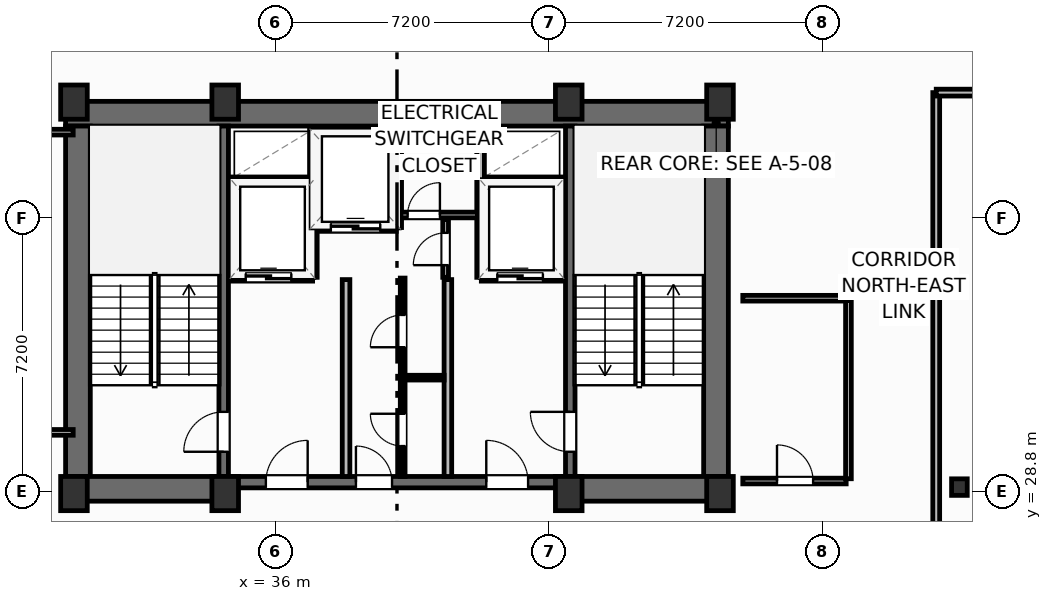
"""IFC4 building model, lengths in metres.
Left out: names, types, materials, properties, quantities, classifications, styles, units other than length and angle.
Written with IfcOpenShell. Run it as: python <this file> out.ifc"""

import sys

from ifc_helpers import new_model, si_unit, direction, frame, frame_2d, origin, origin_2d, place, context, subcontext, project, spatial, rectangle, i_section, extrude, element, fill, save


model = new_model("IFC4")
c1 = context("Model", 3, precision=1e-05, world=origin(), true_north=direction((0.0, 1.0)))
c2 = subcontext(c1, "Body", "Model", "MODEL_VIEW")
j1 = project(units=[si_unit("LENGTHUNIT", "METRE"), si_unit("PLANEANGLEUNIT", "RADIAN")], contexts=[c1])
p1 = place(None, origin())
s1 = spatial("IfcSite", under=j1, at=p1, CompositionType="ELEMENT")
p2 = place(p1, origin())
s2 = spatial("IfcBuilding", under=s1, at=p2, CompositionType="ELEMENT")
p3 = place(p2, frame((0.0, 0.0, 216.4)))
s3 = spatial("IfcBuildingStorey", under=s2, at=p3, CompositionType="ELEMENT", Elevation=216.4)
for number, where, z_axis, x_axis in (
    (1, (30.7, 28.75, 0.0), (0.0, 0.0, 1.0), (1.0, 0.0, 0.0)),
    (2, (34.68, 28.75, 0.0), (0.0, 0.0, 1.0), (1.0, 0.0, 0.0)),
    (3, (43.72, 28.75, 0.0), (0.0, 0.0, 1.0), (1.0, 0.0, 0.0)),
    (4, (47.7, 28.75, 0.0), (0.0, 0.0, 1.0), (1.0, 0.0, 0.0)),
    (5, (30.7, 39.05, 0.0), (0.0, 0.0, 1.0), (1.0, 0.0, 0.0)),
    (6, (34.68, 39.05, 0.0), (0.0, 0.0, 1.0), (1.0, 0.0, 0.0)),
    (7, (43.72, 39.05, 0.0), (0.0, 0.0, 1.0), (1.0, 0.0, 0.0)),
    (8, (47.7, 39.05, 0.0), (0.0, 0.0, 1.0), (1.0, 0.0, 0.0)),
):
    element("IfcColumn", number, at=place(p3, frame(where, z_axis=z_axis, x_axis=x_axis)), inside=s3, PredefinedType="COLUMN", context=c2, shape_type="SweptSolid", body=[
        extrude(rectangle(XDim=0.7, YDim=0.9, at=origin_2d()), origin(), (0.0, 0.0, 1.0), 3.7),
    ])
p4 = place(p3, frame((54.0, 28.92, 0.0), z_axis=(0.0, 0.0, 1.0), x_axis=(1.0, 0.0, 0.0)))
e9 = element("IfcColumn", 9, at=p4, inside=s3, PredefinedType="COLUMN", context=c2, shape_type="SweptSolid", body=[
    extrude(i_section(OverallWidth=0.412, OverallDepth=0.435, WebThickness=0.036, FlangeThickness=0.057, FilletRadius=0.025, at=origin_2d()), origin(), (0.0, 0.0, 1.0), 3.7),
])
p5 = place(p3, frame((30.48, 38.745, 0.0), z_axis=(0.0, 0.0, 1.0), x_axis=(1.0, 0.0, 0.0)))
e10 = element("IfcWall", 10, at=p5, inside=s3, PredefinedType="SHEAR", context=c2, shape_type="SweptSolid", body=[
    extrude(rectangle(XDim=17.44, YDim=0.65, at=frame_2d((8.72, 0.0))), origin(), (0.0, 0.0, 1.0), 3.45),
])
for number, where, z_axis, x_axis in (
    (11, (30.805, 29.2, 0.0), (0.0, 0.0, 1.0), (0.0, 1.0, 0.0)),
    (12, (47.595, 29.2, 0.0), (0.0, 0.0, 1.0), (0.0, 1.0, 0.0)),
):
    element("IfcWall", number, at=place(p3, frame(where, z_axis=z_axis, x_axis=x_axis)), inside=s3, PredefinedType="SHEAR", context=c2, shape_type="SweptSolid", body=[
        extrude(rectangle(XDim=9.22, YDim=0.65, at=frame_2d((4.61, 0.0))), origin(), (0.0, 0.0, 1.0), 3.45),
    ])
p6 = place(p3, frame((30.48, 28.875, 0.0), z_axis=(0.0, 0.0, 1.0), x_axis=(1.0, 0.0, 0.0)))
e13 = element("IfcWall", 13, at=p6, inside=s3, PredefinedType="SHEAR", context=c2, shape_type="SweptSolid", body=[
    extrude(rectangle(XDim=4.32, YDim=0.65, at=frame_2d((2.16, 0.0))), origin(), (0.0, 0.0, 1.0), 3.45),
])
p7 = place(p3, frame((43.6, 28.875, 0.0), z_axis=(0.0, 0.0, 1.0), x_axis=(1.0, 0.0, 0.0)))
e14 = element("IfcWall", 14, at=p7, inside=s3, PredefinedType="SHEAR", context=c2, shape_type="SweptSolid", body=[
    extrude(rectangle(XDim=4.32, YDim=0.65, at=frame_2d((2.16, 0.0))), origin(), (0.0, 0.0, 1.0), 3.45),
])
p8 = place(p3, frame((34.8, 29.05, 0.0), z_axis=(0.0, 0.0, 1.0), x_axis=(1.0, 0.0, 0.0)))
e15 = element("IfcWall", 15, at=p8, inside=s3, PredefinedType="SHEAR", context=c2, shape_type="SweptSolid", body=[
    extrude(rectangle(XDim=8.8, YDim=0.3, at=frame_2d((4.4, 0.0))), origin(), (0.0, 0.0, 1.0), 3.45),
])
p9 = place(p8, frame((0.95, 0.0, 0.0)))
e16 = element("IfcOpeningElement", 16, at=p9, cuts=e15, PredefinedType="OPENING", context=c2, shape_type="SweptSolid", body=[
    extrude(rectangle(XDim=1.1, YDim=2.15, at=frame_2d((0.55, 1.075))), frame((0.0, 0.16, 0.0), z_axis=(0.0, -1.0, 0.0), x_axis=(1.0, 0.0, 0.0)), (0.0, 0.0, 1.0), 0.32),
])
p10 = place(p8, frame((6.75, 0.0, 0.0)))
e17 = element("IfcOpeningElement", 17, at=p10, cuts=e15, PredefinedType="OPENING", context=c2, shape_type="SweptSolid", body=[
    extrude(rectangle(XDim=1.1, YDim=2.15, at=frame_2d((0.55, 1.075))), frame((0.0, 0.16, 0.0), z_axis=(0.0, -1.0, 0.0), x_axis=(1.0, 0.0, 0.0)), (0.0, 0.0, 1.0), 0.32),
])
p11 = place(p8, frame((3.32, 0.0, 0.0)))
e18 = element("IfcOpeningElement", 18, at=p11, cuts=e15, PredefinedType="OPENING", context=c2, shape_type="SweptSolid", body=[
    extrude(rectangle(XDim=0.95, YDim=2.15, at=frame_2d((0.475, 1.075))), frame((0.0, 0.16, 0.0), z_axis=(0.0, -1.0, 0.0), x_axis=(1.0, 0.0, 0.0)), (0.0, 0.0, 1.0), 0.32),
])
p12 = place(p3, frame((34.64, 29.2, 0.0), z_axis=(0.0, 0.0, 1.0), x_axis=(0.0, 1.0, 0.0)))
e19 = element("IfcWall", 19, at=p12, inside=s3, PredefinedType="SHEAR", context=c2, shape_type="SweptSolid", body=[
    extrude(rectangle(XDim=9.22, YDim=0.25, at=frame_2d((4.61, 0.0))), origin(), (0.0, 0.0, 1.0), 3.45),
])
p13 = place(p12, frame((0.65, 0.0, 0.0)))
e20 = element("IfcOpeningElement", 20, at=p13, cuts=e19, PredefinedType="OPENING", context=c2, shape_type="SweptSolid", body=[
    extrude(rectangle(XDim=1.05, YDim=2.15, at=frame_2d((0.525, 1.075))), frame((0.0, 0.135, 0.0), z_axis=(0.0, -1.0, 0.0), x_axis=(1.0, 0.0, 0.0)), (0.0, 0.0, 1.0), 0.27),
])
p14 = place(p3, frame((43.76, 29.2, 0.0), z_axis=(0.0, 0.0, 1.0), x_axis=(0.0, 1.0, 0.0)))
e21 = element("IfcWall", 21, at=p14, inside=s3, PredefinedType="SHEAR", context=c2, shape_type="SweptSolid", body=[
    extrude(rectangle(XDim=9.22, YDim=0.25, at=frame_2d((4.61, 0.0))), origin(), (0.0, 0.0, 1.0), 3.45),
])
p15 = place(p14, frame((0.65, 0.0, 0.0)))
e22 = element("IfcOpeningElement", 22, at=p15, cuts=e21, PredefinedType="OPENING", context=c2, shape_type="SweptSolid", body=[
    extrude(rectangle(XDim=1.05, YDim=2.15, at=frame_2d((0.525, 1.075))), frame((0.0, 0.135, 0.0), z_axis=(0.0, -1.0, 0.0), x_axis=(1.0, 0.0, 0.0)), (0.0, 0.0, 1.0), 0.27),
])
p16 = place(p3, frame((53.39, 19.24, 0.0), z_axis=(0.0, 0.0, 1.0), x_axis=(0.0, 1.0, 0.0)))
e23 = element("IfcWall", 23, at=p16, inside=s3, PredefinedType="PARTITIONING", context=c2, shape_type="SweptSolid", body=[
    extrude(rectangle(XDim=20.06, YDim=0.18, at=frame_2d((10.03, 0.0))), origin(), (0.0, 0.0, 1.0), 3.45),
])
p17 = place(p16, frame((7.7, 0.0, 0.0)))
e24 = element("IfcOpeningElement", 24, at=p17, cuts=e23, PredefinedType="OPENING", context=c2, shape_type="SweptSolid", body=[
    extrude(rectangle(XDim=0.95, YDim=2.05, at=frame_2d((0.475, 1.025))), frame((0.0, 0.1, 0.0), z_axis=(0.0, -1.0, 0.0), x_axis=(1.0, 0.0, 0.0)), (0.0, 0.0, 1.0), 0.2),
])
p18 = place(p3, frame((53.39, 39.3, 0.0), z_axis=(0.0, 0.0, 1.0), x_axis=(1.0, 0.0, 0.0)))
e25 = element("IfcWall", 25, at=p18, inside=s3, PredefinedType="PARTITIONING", context=c2, shape_type="SweptSolid", body=[
    extrude(rectangle(XDim=15.713, YDim=0.18, at=frame_2d((7.856, 0.0))), origin(), (0.0, 0.0, 1.0), 3.45),
])
for number, where, z_axis, x_axis in (
    (26, (37.86, 29.2, 0.0), (0.0, 0.0, 1.0), (0.0, 1.0, 0.0)),
    (27, (40.54, 29.2, 0.0), (0.0, 0.0, 1.0), (0.0, 1.0, 0.0)),
):
    element("IfcWall", number, at=place(p3, frame(where, z_axis=z_axis, x_axis=x_axis)), inside=s3, PredefinedType="PARTITIONING", context=c2, shape_type="SweptSolid", body=[
        extrude(rectangle(XDim=5.18, YDim=0.2, at=frame_2d((2.59, 0.0))), origin(), (0.0, 0.0, 1.0), 3.45),
    ])
p19 = place(p3, frame((34.8, 34.44, 0.0), z_axis=(0.0, 0.0, 1.0), x_axis=(1.0, 0.0, 0.0)))
e28 = element("IfcWall", 28, at=p19, inside=s3, PredefinedType="PARTITIONING", context=c2, shape_type="SweptSolid", body=[
    extrude(rectangle(XDim=2.18, YDim=0.2, at=frame_2d((1.09, 0.0))), origin(), (0.0, 0.0, 1.0), 3.45),
])
p20 = place(p19, frame((0.42, 0.0, 0.0)))
e29 = element("IfcOpeningElement", 29, at=p20, cuts=e28, PredefinedType="OPENING", context=c2, shape_type="SweptSolid", body=[
    extrude(rectangle(XDim=1.2, YDim=2.2, at=frame_2d((0.6, 1.1))), frame((0.0, 0.11, 0.0), z_axis=(0.0, -1.0, 0.0), x_axis=(1.0, 0.0, 0.0)), (0.0, 0.0, 1.0), 0.22),
])
p21 = place(p3, frame((34.8, 36.98, 0.0), z_axis=(0.0, 0.0, 1.0), x_axis=(1.0, 0.0, 0.0)))
e30 = element("IfcWall", 30, at=p21, inside=s3, PredefinedType="PARTITIONING", context=c2, shape_type="SweptSolid", body=[
    extrude(rectangle(XDim=2.18, YDim=0.2, at=frame_2d((1.09, 0.0))), origin(), (0.0, 0.0, 1.0), 3.45),
])
p22 = place(p3, frame((37.0, 34.44, 0.0), z_axis=(0.0, 0.0, 1.0), x_axis=(0.0, 1.0, 0.0)))
e31 = element("IfcWall", 31, at=p22, inside=s3, PredefinedType="PARTITIONING", context=c2, shape_type="SweptSolid", body=[
    extrude(rectangle(XDim=3.9, YDim=0.2, at=frame_2d((1.95, 0.0))), origin(), (0.0, 0.0, 1.0), 3.45),
])
p23 = place(p3, frame((41.42, 34.44, 0.0), z_axis=(0.0, 0.0, 1.0), x_axis=(1.0, 0.0, 0.0)))
e32 = element("IfcWall", 32, at=p23, inside=s3, PredefinedType="PARTITIONING", context=c2, shape_type="SweptSolid", body=[
    extrude(rectangle(XDim=2.18, YDim=0.2, at=frame_2d((1.09, 0.0))), origin(), (0.0, 0.0, 1.0), 3.45),
])
p24 = place(p23, frame((0.42, 0.0, 0.0)))
e33 = element("IfcOpeningElement", 33, at=p24, cuts=e32, PredefinedType="OPENING", context=c2, shape_type="SweptSolid", body=[
    extrude(rectangle(XDim=1.2, YDim=2.2, at=frame_2d((0.6, 1.1))), frame((0.0, 0.11, 0.0), z_axis=(0.0, -1.0, 0.0), x_axis=(1.0, 0.0, 0.0)), (0.0, 0.0, 1.0), 0.22),
])
p25 = place(p3, frame((41.42, 36.98, 0.0), z_axis=(0.0, 0.0, 1.0), x_axis=(1.0, 0.0, 0.0)))
e34 = element("IfcWall", 34, at=p25, inside=s3, PredefinedType="PARTITIONING", context=c2, shape_type="SweptSolid", body=[
    extrude(rectangle(XDim=2.18, YDim=0.2, at=frame_2d((1.09, 0.0))), origin(), (0.0, 0.0, 1.0), 3.45),
])
p26 = place(p3, frame((41.4, 34.44, 0.0), z_axis=(0.0, 0.0, 1.0), x_axis=(0.0, 1.0, 0.0)))
e35 = element("IfcWall", 35, at=p26, inside=s3, PredefinedType="PARTITIONING", context=c2, shape_type="SweptSolid", body=[
    extrude(rectangle(XDim=3.9, YDim=0.2, at=frame_2d((1.95, 0.0))), origin(), (0.0, 0.0, 1.0), 3.45),
])
p27 = place(p3, frame((37.06, 35.75, 0.0), z_axis=(0.0, 0.0, 1.0), x_axis=(1.0, 0.0, 0.0)))
e36 = element("IfcWall", 36, at=p27, inside=s3, PredefinedType="PARTITIONING", context=c2, shape_type="SweptSolid", body=[
    extrude(rectangle(XDim=2.12, YDim=0.2, at=frame_2d((1.06, 0.0))), origin(), (0.0, 0.0, 1.0), 3.45),
])
p28 = place(p27, frame((0.4, 0.0, 0.0)))
e37 = element("IfcOpeningElement", 37, at=p28, cuts=e36, PredefinedType="OPENING", context=c2, shape_type="SweptSolid", body=[
    extrude(rectangle(XDim=1.3, YDim=2.2, at=frame_2d((0.65, 1.1))), frame((0.0, 0.11, 0.0), z_axis=(0.0, -1.0, 0.0), x_axis=(1.0, 0.0, 0.0)), (0.0, 0.0, 1.0), 0.22),
])
p29 = place(p3, frame((39.22, 35.75, 0.0), z_axis=(0.0, 0.0, 1.0), x_axis=(0.0, 1.0, 0.0)))
e38 = element("IfcWall", 38, at=p29, inside=s3, PredefinedType="PARTITIONING", context=c2, shape_type="SweptSolid", body=[
    extrude(rectangle(XDim=2.59, YDim=0.2, at=frame_2d((1.295, 0.0))), origin(), (0.0, 0.0, 1.0), 3.45),
])
p30 = place(p3, frame((39.3, 36.08, 0.0), z_axis=(0.0, 0.0, 1.0), x_axis=(1.0, 0.0, 0.0)))
e39 = element("IfcWall", 39, at=p30, inside=s3, PredefinedType="PARTITIONING", context=c2, shape_type="SweptSolid", body=[
    extrude(rectangle(XDim=2.02, YDim=0.15, at=frame_2d((1.01, 0.0))), origin(), (0.0, 0.0, 1.0), 3.45),
])
p31 = place(p30, frame((0.18, 0.0, 0.0)))
e40 = element("IfcOpeningElement", 40, at=p31, cuts=e39, PredefinedType="OPENING", context=c2, shape_type="SweptSolid", body=[
    extrude(rectangle(XDim=0.85, YDim=2.05, at=frame_2d((0.425, 1.025))), frame((0.0, 0.085, 0.0), z_axis=(0.0, -1.0, 0.0), x_axis=(1.0, 0.0, 0.0)), (0.0, 0.0, 1.0), 0.17),
])
p32 = place(p3, frame((40.48, 34.44, 0.0), z_axis=(0.0, 0.0, 1.0), x_axis=(0.0, 1.0, 0.0)))
e41 = element("IfcWall", 41, at=p32, inside=s3, PredefinedType="PARTITIONING", context=c2, shape_type="SweptSolid", body=[
    extrude(rectangle(XDim=1.52, YDim=0.15, at=frame_2d((0.76, 0.0))), origin(), (0.0, 0.0, 1.0), 3.45),
])
p33 = place(p32, frame((0.32, 0.0, 0.0)))
e42 = element("IfcOpeningElement", 42, at=p33, cuts=e41, PredefinedType="OPENING", context=c2, shape_type="SweptSolid", body=[
    extrude(rectangle(XDim=0.85, YDim=2.05, at=frame_2d((0.425, 1.025))), frame((0.0, 0.085, 0.0), z_axis=(0.0, -1.0, 0.0), x_axis=(1.0, 0.0, 0.0)), (0.0, 0.0, 1.0), 0.17),
])
p34 = place(p3, frame((39.35, 31.8, 0.0), z_axis=(0.0, 0.0, 1.0), x_axis=(1.0, 0.0, 0.0)))
e43 = element("IfcWall", 43, at=p34, inside=s3, PredefinedType="PARTITIONING", context=c2, shape_type="SweptSolid", body=[
    extrude(rectangle(XDim=1.09, YDim=0.125, at=frame_2d((0.545, 0.0))), origin(), (0.0, 0.0, 1.0), 3.45),
])
p35 = place(p3, frame((39.35, 29.2, 0.0), z_axis=(0.0, 0.0, 1.0), x_axis=(0.0, 1.0, 0.0)))
e44 = element("IfcWall", 44, at=p35, inside=s3, PredefinedType="PARTITIONING", context=c2, shape_type="SweptSolid", body=[
    extrude(rectangle(XDim=5.22, YDim=0.125, at=frame_2d((2.61, 0.0))), origin(), (0.0, 0.0, 1.0), 3.45),
])
p36 = place(p35, frame((0.8, 0.0, 0.0)))
e45 = element("IfcOpeningElement", 45, at=p36, cuts=e44, PredefinedType="OPENING", context=c2, shape_type="SweptSolid", body=[
    extrude(rectangle(XDim=0.85, YDim=2.05, at=frame_2d((0.425, 1.025))), frame((0.0, 0.073, 0.0), z_axis=(0.0, -1.0, 0.0), x_axis=(1.0, 0.0, 0.0)), (0.0, 0.0, 1.0), 0.145),
])
p37 = place(p35, frame((3.4, 0.0, 0.0)))
e46 = element("IfcOpeningElement", 46, at=p37, cuts=e44, PredefinedType="OPENING", context=c2, shape_type="SweptSolid", body=[
    extrude(rectangle(XDim=0.85, YDim=2.05, at=frame_2d((0.425, 1.025))), frame((0.0, 0.073, 0.0), z_axis=(0.0, -1.0, 0.0), x_axis=(1.0, 0.0, 0.0)), (0.0, 0.0, 1.0), 0.145),
])
for number, where, z_axis, x_axis in (
    (47, (26.78, 30.36, 0.0), (0.0, 0.0, 1.0), (1.0, 0.0, 0.0)),
    (48, (26.78, 38.26, 0.0), (0.0, 0.0, 1.0), (1.0, 0.0, 0.0)),
):
    element("IfcWall", number, at=place(p3, frame(where, z_axis=z_axis, x_axis=x_axis)), inside=s3, PredefinedType="PARTITIONING", context=c2, shape_type="SweptSolid", body=[
        extrude(rectangle(XDim=3.9, YDim=0.15, at=frame_2d((1.95, 0.0))), origin(), (0.0, 0.0, 1.0), 3.45),
    ])
p38 = place(p3, frame((48.3, 29.08, 0.0), z_axis=(0.0, 0.0, 1.0), x_axis=(1.0, 0.0, 0.0)))
e49 = element("IfcWall", 49, at=p38, inside=s3, PredefinedType="PARTITIONING", context=c2, shape_type="SweptSolid", body=[
    extrude(rectangle(XDim=2.72, YDim=0.15, at=frame_2d((1.36, 0.0))), origin(), (0.0, 0.0, 1.0), 2.662),
])
p39 = place(p38, frame((0.9, 0.0, 0.0)))
e50 = element("IfcOpeningElement", 50, at=p39, cuts=e49, PredefinedType="OPENING", context=c2, shape_type="SweptSolid", body=[
    extrude(rectangle(XDim=0.95, YDim=2.05, at=frame_2d((0.475, 1.025))), frame((0.0, 0.085, 0.0), z_axis=(0.0, -1.0, 0.0), x_axis=(1.0, 0.0, 0.0)), (0.0, 0.0, 1.0), 0.17),
])
p40 = place(p3, frame((48.3, 33.89, 0.0), z_axis=(0.0, 0.0, 1.0), x_axis=(1.0, 0.0, 0.0)))
e51 = element("IfcWall", 51, at=p40, inside=s3, PredefinedType="PARTITIONING", context=c2, shape_type="SweptSolid", body=[
    extrude(rectangle(XDim=2.72, YDim=0.15, at=frame_2d((1.36, 0.0))), origin(), (0.0, 0.0, 1.0), 3.45),
])
p41 = place(p3, frame((51.08, 29.14, 0.0), z_axis=(0.0, 0.0, 1.0), x_axis=(0.0, 1.0, 0.0)))
e52 = element("IfcWall", 52, at=p41, inside=s3, PredefinedType="PARTITIONING", context=c2, shape_type="SweptSolid", body=[
    extrude(rectangle(XDim=4.69, YDim=0.15, at=frame_2d((2.345, 0.0))), origin(), (0.0, 0.0, 1.0), 3.45),
])
p42 = place(p13, origin())
e53 = element("IfcDoor", 53, at=p42, inside=s3, OperationType="SINGLE_SWING_LEFT", PredefinedType="DOOR", context=c2, shape_type="SweptSolid", body=[
    extrude(rectangle(XDim=1.05, YDim=2.15, at=frame_2d((0.525, 1.075))), frame((0.0, 0.025, 0.0), z_axis=(0.0, -1.0, 0.0), x_axis=(1.0, 0.0, 0.0)), (0.0, 0.0, 1.0), 0.05),
])
fill(e20, e53)
p43 = place(p15, origin())
e54 = element("IfcDoor", 54, at=p43, inside=s3, OperationType="SINGLE_SWING_RIGHT", PredefinedType="DOOR", context=c2, shape_type="SweptSolid", body=[
    extrude(rectangle(XDim=1.05, YDim=2.15, at=frame_2d((0.525, 1.075))), frame((0.0, 0.025, 0.0), z_axis=(0.0, -1.0, 0.0), x_axis=(1.0, 0.0, 0.0)), (0.0, 0.0, 1.0), 0.05),
])
fill(e22, e54)
p44 = place(p9, origin())
e55 = element("IfcDoor", 55, at=p44, inside=s3, OperationType="SINGLE_SWING_RIGHT", PredefinedType="DOOR", context=c2, shape_type="SweptSolid", body=[
    extrude(rectangle(XDim=1.1, YDim=2.15, at=frame_2d((0.55, 1.075))), frame((0.0, 0.025, 0.0), z_axis=(0.0, -1.0, 0.0), x_axis=(1.0, 0.0, 0.0)), (0.0, 0.0, 1.0), 0.05),
])
fill(e16, e55)
p45 = place(p10, origin())
e56 = element("IfcDoor", 56, at=p45, inside=s3, OperationType="SINGLE_SWING_LEFT", PredefinedType="DOOR", context=c2, shape_type="SweptSolid", body=[
    extrude(rectangle(XDim=1.1, YDim=2.15, at=frame_2d((0.55, 1.075))), frame((0.0, 0.025, 0.0), z_axis=(0.0, -1.0, 0.0), x_axis=(1.0, 0.0, 0.0)), (0.0, 0.0, 1.0), 0.05),
])
fill(e17, e56)
p46 = place(p20, origin())
e57 = element("IfcDoor", 57, at=p46, inside=s3, OperationType="SLIDING_TO_LEFT", PredefinedType="DOOR", context=c2, shape_type="SweptSolid", body=[
    extrude(rectangle(XDim=1.2, YDim=2.2, at=frame_2d((0.6, 1.1))), frame((0.0, 0.025, 0.0), z_axis=(0.0, -1.0, 0.0), x_axis=(1.0, 0.0, 0.0)), (0.0, 0.0, 1.0), 0.05),
])
fill(e29, e57)
p47 = place(p24, origin())
e58 = element("IfcDoor", 58, at=p47, inside=s3, OperationType="SLIDING_TO_LEFT", PredefinedType="DOOR", context=c2, shape_type="SweptSolid", body=[
    extrude(rectangle(XDim=1.2, YDim=2.2, at=frame_2d((0.6, 1.1))), frame((0.0, 0.025, 0.0), z_axis=(0.0, -1.0, 0.0), x_axis=(1.0, 0.0, 0.0)), (0.0, 0.0, 1.0), 0.05),
])
fill(e33, e58)
p48 = place(p28, origin())
e59 = element("IfcDoor", 59, at=p48, inside=s3, OperationType="SLIDING_TO_LEFT", PredefinedType="DOOR", context=c2, shape_type="SweptSolid", body=[
    extrude(rectangle(XDim=1.3, YDim=2.2, at=frame_2d((0.65, 1.1))), frame((0.0, 0.025, 0.0), z_axis=(0.0, -1.0, 0.0), x_axis=(1.0, 0.0, 0.0)), (0.0, 0.0, 1.0), 0.05),
])
fill(e37, e59)
p49 = place(p31, origin())
e60 = element("IfcDoor", 60, at=p49, inside=s3, OperationType="SINGLE_SWING_RIGHT", PredefinedType="DOOR", context=c2, shape_type="SweptSolid", body=[
    extrude(rectangle(XDim=0.85, YDim=2.05, at=frame_2d((0.425, 1.025))), frame((0.0, 0.025, 0.0), z_axis=(0.0, -1.0, 0.0), x_axis=(1.0, 0.0, 0.0)), (0.0, 0.0, 1.0), 0.05),
])
fill(e40, e60)
p50 = place(p33, origin())
e61 = element("IfcDoor", 61, at=p50, inside=s3, OperationType="SINGLE_SWING_LEFT", PredefinedType="DOOR", context=c2, shape_type="SweptSolid", body=[
    extrude(rectangle(XDim=0.85, YDim=2.05, at=frame_2d((0.425, 1.025))), frame((0.0, 0.025, 0.0), z_axis=(0.0, -1.0, 0.0), x_axis=(1.0, 0.0, 0.0)), (0.0, 0.0, 1.0), 0.05),
])
fill(e42, e61)
p51 = place(p36, origin())
e62 = element("IfcDoor", 62, at=p51, inside=s3, OperationType="SINGLE_SWING_RIGHT", PredefinedType="DOOR", context=c2, shape_type="SweptSolid", body=[
    extrude(rectangle(XDim=0.85, YDim=2.05, at=frame_2d((0.425, 1.025))), frame((0.0, 0.025, 0.0), z_axis=(0.0, -1.0, 0.0), x_axis=(1.0, 0.0, 0.0)), (0.0, 0.0, 1.0), 0.05),
])
fill(e45, e62)
p52 = place(p37, origin())
e63 = element("IfcDoor", 63, at=p52, inside=s3, OperationType="SINGLE_SWING_LEFT", PredefinedType="DOOR", context=c2, shape_type="SweptSolid", body=[
    extrude(rectangle(XDim=0.85, YDim=2.05, at=frame_2d((0.425, 1.025))), frame((0.0, 0.025, 0.0), z_axis=(0.0, -1.0, 0.0), x_axis=(1.0, 0.0, 0.0)), (0.0, 0.0, 1.0), 0.05),
])
fill(e46, e63)
p53 = place(p11, origin())
e64 = element("IfcDoor", 64, at=p53, inside=s3, OperationType="SINGLE_SWING_LEFT", PredefinedType="DOOR", context=c2, shape_type="SweptSolid", body=[
    extrude(rectangle(XDim=0.95, YDim=2.15, at=frame_2d((0.475, 1.075))), frame((0.0, 0.025, 0.0), z_axis=(0.0, -1.0, 0.0), x_axis=(1.0, 0.0, 0.0)), (0.0, 0.0, 1.0), 0.05),
])
fill(e18, e64)
p54 = place(p39, origin())
e65 = element("IfcDoor", 65, at=p54, inside=s3, OperationType="SINGLE_SWING_LEFT", PredefinedType="DOOR", context=c2, shape_type="SweptSolid", body=[
    extrude(rectangle(XDim=0.95, YDim=2.05, at=frame_2d((0.475, 1.025))), frame((0.0, 0.025, 0.0), z_axis=(0.0, -1.0, 0.0), x_axis=(1.0, 0.0, 0.0)), (0.0, 0.0, 1.0), 0.05),
])
fill(e50, e65)
save(model, sys.argv[1])
